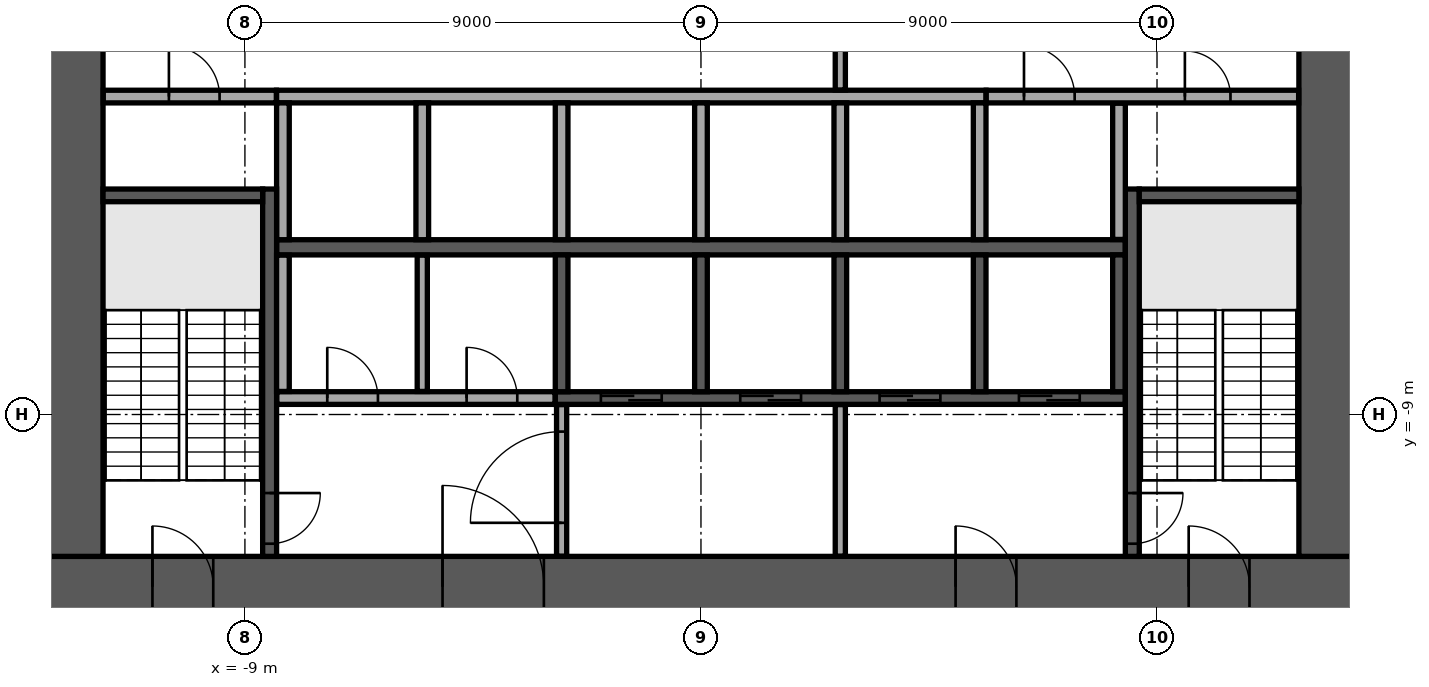
"""IFC4 building model, lengths in metres.
Left out: names, types, materials, properties, quantities, classifications, styles, units other than length and angle.
Written with IfcOpenShell. Run it as: python <this file> out.ifc"""

import sys

from ifc_helpers import new_model, si_unit, direction, frame, frame_2d, origin, place, context, subcontext, project, spatial, rectangle, extrude, element, fill, save


model = new_model("IFC4")
c1 = context("Model", 3, precision=1e-05, world=origin(), true_north=direction((0.0, 1.0)))
c2 = subcontext(c1, "Body", "Model", "MODEL_VIEW")
j1 = project(units=[si_unit("LENGTHUNIT", "METRE"), si_unit("PLANEANGLEUNIT", "RADIAN")], contexts=[c1])
p1 = place(None, origin())
s1 = spatial("IfcSite", under=j1, at=p1, CompositionType="ELEMENT")
p2 = place(p1, origin())
s2 = spatial("IfcBuilding", under=s1, at=p2, CompositionType="ELEMENT")
p3 = place(p2, frame((0.0, 0.0, 22.5)))
s3 = spatial("IfcBuildingStorey", under=s2, at=p3, CompositionType="ELEMENT", Elevation=22.5)
p4 = place(p3, frame((-13.0, -12.4, 0.0), z_axis=(0.0, 0.0, 1.0), x_axis=(1.0, 0.0, 0.0)))
e1 = element("IfcWall", 1, at=p4, inside=s3, PredefinedType="SHEAR", context=c2, shape_type="SweptSolid", body=[
    extrude(rectangle(XDim=26.0, YDim=1.2, at=frame_2d((13.0, 0.0))), origin(), (0.0, 0.0, 1.0), 4.35),
])
p5 = place(p4, frame((7.9, 0.0, 0.0)))
e2 = element("IfcOpeningElement", 2, at=p5, cuts=e1, PredefinedType="OPENING", context=c2, shape_type="SweptSolid", body=[
    extrude(rectangle(XDim=2.0, YDim=2.1, at=frame_2d((1.0, 1.05))), frame((0.0, 0.61, 0.0), z_axis=(0.0, -1.0, 0.0), x_axis=(1.0, 0.0, 0.0)), (0.0, 0.0, 1.0), 1.22),
])
p6 = place(p4, frame((18.025, 0.0, 0.0)))
e3 = element("IfcOpeningElement", 3, at=p6, cuts=e1, PredefinedType="OPENING", context=c2, shape_type="SweptSolid", body=[
    extrude(rectangle(XDim=1.2, YDim=2.1, at=frame_2d((0.6, 1.05))), frame((0.0, 0.61, 0.0), z_axis=(0.0, -1.0, 0.0), x_axis=(1.0, 0.0, 0.0)), (0.0, 0.0, 1.0), 1.22),
])
p7 = place(p4, frame((2.175, 0.0, 0.0)))
e4 = element("IfcOpeningElement", 4, at=p7, cuts=e1, PredefinedType="OPENING", context=c2, shape_type="SweptSolid", body=[
    extrude(rectangle(XDim=1.2, YDim=2.1, at=frame_2d((0.6, 1.05))), frame((0.0, 0.61, 0.0), z_axis=(0.0, -1.0, 0.0), x_axis=(1.0, 0.0, 0.0)), (0.0, 0.0, 1.0), 1.22),
])
p8 = place(p4, frame((22.625, 0.0, 0.0)))
e5 = element("IfcOpeningElement", 5, at=p8, cuts=e1, PredefinedType="OPENING", context=c2, shape_type="SweptSolid", body=[
    extrude(rectangle(XDim=1.2, YDim=2.1, at=frame_2d((0.6, 1.05))), frame((0.0, 0.61, 0.0), z_axis=(0.0, -1.0, 0.0), x_axis=(1.0, 0.0, 0.0)), (0.0, 0.0, 1.0), 1.22),
])
p9 = place(p3, frame((12.4, -11.8, 0.0), z_axis=(0.0, 0.0, 1.0), x_axis=(0.0, 1.0, 0.0)))
e6 = element("IfcWall", 6, at=p9, inside=s3, PredefinedType="SHEAR", context=c2, shape_type="SweptSolid", body=[
    extrude(rectangle(XDim=23.6, YDim=1.2, at=frame_2d((11.8, 0.0))), origin(), (0.0, 0.0, 1.0), 4.35),
])
p10 = place(p9, frame((10.6, 0.0, 0.0)))
e7 = element("IfcOpeningElement", 7, at=p10, cuts=e6, PredefinedType="OPENING", context=c2, shape_type="SweptSolid", body=[
    extrude(rectangle(XDim=2.4, YDim=2.4, at=frame_2d((1.2, 1.2))), frame((0.0, 0.61, 0.0), z_axis=(0.0, -1.0, 0.0), x_axis=(1.0, 0.0, 0.0)), (0.0, 0.0, 1.0), 1.22),
])
p11 = place(p3, frame((-12.4, -11.8, 0.0), z_axis=(0.0, 0.0, 1.0), x_axis=(0.0, 1.0, 0.0)))
e8 = element("IfcWall", 8, at=p11, inside=s3, PredefinedType="SHEAR", context=c2, shape_type="SweptSolid", body=[
    extrude(rectangle(XDim=23.6, YDim=1.2, at=frame_2d((11.8, 0.0))), origin(), (0.0, 0.0, 1.0), 4.35),
])
p12 = place(p11, frame((10.6, 0.0, 0.0)))
e9 = element("IfcOpeningElement", 9, at=p12, cuts=e8, PredefinedType="OPENING", context=c2, shape_type="SweptSolid", body=[
    extrude(rectangle(XDim=2.4, YDim=2.4, at=frame_2d((1.2, 1.2))), frame((0.0, 0.61, 0.0), z_axis=(0.0, -1.0, 0.0), x_axis=(1.0, 0.0, 0.0)), (0.0, 0.0, 1.0), 1.22),
])
p13 = place(p3, frame((-8.375, -5.7, 0.0), z_axis=(0.0, 0.0, 1.0), x_axis=(1.0, 0.0, 0.0)))
e10 = element("IfcWall", 10, at=p13, inside=s3, PredefinedType="SOLIDWALL", context=c2, shape_type="SweptSolid", body=[
    extrude(rectangle(XDim=16.75, YDim=0.3, at=frame_2d((8.375, 0.0))), origin(), (0.0, 0.0, 1.0), 4.35),
])
p14 = place(p3, frame((-8.375, -2.725, 0.0), z_axis=(0.0, 0.0, 1.0), x_axis=(1.0, 0.0, 0.0)))
e11 = element("IfcWall", 11, at=p14, inside=s3, PredefinedType="SOLIDWALL", context=c2, shape_type="SweptSolid", body=[
    extrude(rectangle(XDim=14.0, YDim=0.25, at=frame_2d((7.0, 0.0))), origin(), (0.0, 0.0, 1.0), 4.35),
])
for number, where, z_axis, x_axis in (
    (12, (-8.25, -5.55, 0.0), (0.0, 0.0, 1.0), (0.0, 1.0, 0.0)),
    (13, (-5.5, -5.55, 0.0), (0.0, 0.0, 1.0), (0.0, 1.0, 0.0)),
    (14, (-2.75, -5.55, 0.0), (0.0, 0.0, 1.0), (0.0, 1.0, 0.0)),
    (15, (0.0, -5.55, 0.0), (0.0, 0.0, 1.0), (0.0, 1.0, 0.0)),
    (16, (2.75, -5.55, 0.0), (0.0, 0.0, 1.0), (0.0, 1.0, 0.0)),
    (17, (5.5, -5.55, 0.0), (0.0, 0.0, 1.0), (0.0, 1.0, 0.0)),
):
    element("IfcWall", number, at=place(p3, frame(where, z_axis=z_axis, x_axis=x_axis)), inside=s3, PredefinedType="SOLIDWALL", context=c2, shape_type="SweptSolid", body=[
        extrude(rectangle(XDim=2.7, YDim=0.25, at=frame_2d((1.35, 0.0))), origin(), (0.0, 0.0, 1.0), 4.35),
    ])
p15 = place(p3, frame((-2.875, -8.675, 0.0), z_axis=(0.0, 0.0, 1.0), x_axis=(1.0, 0.0, 0.0)))
e18 = element("IfcWall", 18, at=p15, inside=s3, PredefinedType="SOLIDWALL", context=c2, shape_type="SweptSolid", body=[
    extrude(rectangle(XDim=11.25, YDim=0.25, at=frame_2d((5.625, 0.0))), origin(), (0.0, 0.0, 1.0), 4.35),
])
p16 = place(p15, frame((0.9, 0.0, 0.0)))
e19 = element("IfcOpeningElement", 19, at=p16, cuts=e18, PredefinedType="OPENING", context=c2, shape_type="SweptSolid", body=[
    extrude(rectangle(XDim=1.2, YDim=2.1, at=frame_2d((0.6, 1.05))), frame((0.0, 0.135, 0.0), z_axis=(0.0, -1.0, 0.0), x_axis=(1.0, 0.0, 0.0)), (0.0, 0.0, 1.0), 0.27),
])
p17 = place(p15, frame((3.65, 0.0, 0.0)))
e20 = element("IfcOpeningElement", 20, at=p17, cuts=e18, PredefinedType="OPENING", context=c2, shape_type="SweptSolid", body=[
    extrude(rectangle(XDim=1.2, YDim=2.1, at=frame_2d((0.6, 1.05))), frame((0.0, 0.135, 0.0), z_axis=(0.0, -1.0, 0.0), x_axis=(1.0, 0.0, 0.0)), (0.0, 0.0, 1.0), 0.27),
])
p18 = place(p15, frame((6.4, 0.0, 0.0)))
e21 = element("IfcOpeningElement", 21, at=p18, cuts=e18, PredefinedType="OPENING", context=c2, shape_type="SweptSolid", body=[
    extrude(rectangle(XDim=1.2, YDim=2.1, at=frame_2d((0.6, 1.05))), frame((0.0, 0.135, 0.0), z_axis=(0.0, -1.0, 0.0), x_axis=(1.0, 0.0, 0.0)), (0.0, 0.0, 1.0), 0.27),
])
p19 = place(p15, frame((9.15, 0.0, 0.0)))
e22 = element("IfcOpeningElement", 22, at=p19, cuts=e18, PredefinedType="OPENING", context=c2, shape_type="SweptSolid", body=[
    extrude(rectangle(XDim=1.2, YDim=2.1, at=frame_2d((0.6, 1.05))), frame((0.0, 0.135, 0.0), z_axis=(0.0, -1.0, 0.0), x_axis=(1.0, 0.0, 0.0)), (0.0, 0.0, 1.0), 0.27),
])
for number, where, z_axis, x_axis in (
    (23, (-2.75, -8.55, 0.0), (0.0, 0.0, 1.0), (0.0, 1.0, 0.0)),
    (24, (0.0, -8.55, 0.0), (0.0, 0.0, 1.0), (0.0, 1.0, 0.0)),
    (25, (2.75, -8.55, 0.0), (0.0, 0.0, 1.0), (0.0, 1.0, 0.0)),
    (26, (5.5, -8.55, 0.0), (0.0, 0.0, 1.0), (0.0, 1.0, 0.0)),
    (27, (8.25, -8.55, 0.0), (0.0, 0.0, 1.0), (0.0, 1.0, 0.0)),
):
    element("IfcWall", number, at=place(p3, frame(where, z_axis=z_axis, x_axis=x_axis)), inside=s3, PredefinedType="SOLIDWALL", context=c2, shape_type="SweptSolid", body=[
        extrude(rectangle(XDim=2.7, YDim=0.25, at=frame_2d((1.35, 0.0))), origin(), (0.0, 0.0, 1.0), 4.35),
    ])
p20 = place(p3, frame((-8.512, -4.55, 0.0), z_axis=(0.0, 0.0, 1.0), x_axis=(0.0, -1.0, 0.0)))
e28 = element("IfcWall", 28, at=p20, inside=s3, PredefinedType="SOLIDWALL", context=c2, shape_type="SweptSolid", body=[
    extrude(rectangle(XDim=7.25, YDim=0.275, at=frame_2d((3.625, 0.0))), origin(), (0.0, 0.0, 1.0), 4.35),
])
p21 = place(p20, frame((6.0, 0.0, 0.0)))
e29 = element("IfcOpeningElement", 29, at=p21, cuts=e28, PredefinedType="OPENING", context=c2, shape_type="SweptSolid", body=[
    extrude(rectangle(XDim=1.0, YDim=2.1, at=frame_2d((0.5, 1.05))), frame((0.0, 0.147, 0.0), z_axis=(0.0, -1.0, 0.0), x_axis=(1.0, 0.0, 0.0)), (0.0, 0.0, 1.0), 0.295),
])
p22 = place(p3, frame((-8.65, -4.675, 0.0), z_axis=(0.0, 0.0, 1.0), x_axis=(-1.0, 0.0, 0.0)))
e30 = element("IfcWall", 30, at=p22, inside=s3, PredefinedType="SOLIDWALL", context=c2, shape_type="SweptSolid", body=[
    extrude(rectangle(XDim=3.15, YDim=0.25, at=frame_2d((1.575, 0.0))), origin(), (0.0, 0.0, 1.0), 4.35),
])
p23 = place(p3, frame((8.512, -4.55, 0.0), z_axis=(0.0, 0.0, 1.0), x_axis=(0.0, -1.0, 0.0)))
e31 = element("IfcWall", 31, at=p23, inside=s3, PredefinedType="SOLIDWALL", context=c2, shape_type="SweptSolid", body=[
    extrude(rectangle(XDim=7.25, YDim=0.275, at=frame_2d((3.625, 0.0))), origin(), (0.0, 0.0, 1.0), 4.35),
])
p24 = place(p23, frame((6.0, 0.0, 0.0)))
e32 = element("IfcOpeningElement", 32, at=p24, cuts=e31, PredefinedType="OPENING", context=c2, shape_type="SweptSolid", body=[
    extrude(rectangle(XDim=1.0, YDim=2.1, at=frame_2d((0.5, 1.05))), frame((0.0, 0.147, 0.0), z_axis=(0.0, -1.0, 0.0), x_axis=(1.0, 0.0, 0.0)), (0.0, 0.0, 1.0), 0.295),
])
p25 = place(p3, frame((8.65, -4.675, 0.0), z_axis=(0.0, 0.0, 1.0), x_axis=(1.0, 0.0, 0.0)))
e33 = element("IfcWall", 33, at=p25, inside=s3, PredefinedType="SOLIDWALL", context=c2, shape_type="SweptSolid", body=[
    extrude(rectangle(XDim=3.15, YDim=0.25, at=frame_2d((1.575, 0.0))), origin(), (0.0, 0.0, 1.0), 4.35),
])
p26 = place(p3, frame((-2.75, -11.795, 0.0), z_axis=(0.0, 0.0, 1.0), x_axis=(0.0, 1.0, 0.0)))
e34 = element("IfcWall", 34, at=p26, inside=s3, PredefinedType="PARTITIONING", context=c2, shape_type="SweptSolid", body=[
    extrude(rectangle(XDim=2.99, YDim=0.2, at=frame_2d((1.495, 0.0))), origin(), (0.0, 0.0, 1.0), 4.35),
])
p27 = place(p26, frame((0.657, 0.0, 0.0)))
e35 = element("IfcOpeningElement", 35, at=p27, cuts=e34, PredefinedType="OPENING", context=c2, shape_type="SweptSolid", body=[
    extrude(rectangle(XDim=1.8, YDim=2.1, at=frame_2d((0.9, 1.05))), frame((0.0, 0.11, 0.0), z_axis=(0.0, -1.0, 0.0), x_axis=(1.0, 0.0, 0.0)), (0.0, 0.0, 1.0), 0.22),
])
p28 = place(p3, frame((2.75, -11.795, 0.0), z_axis=(0.0, 0.0, 1.0), x_axis=(0.0, 1.0, 0.0)))
e36 = element("IfcWall", 36, at=p28, inside=s3, PredefinedType="PARTITIONING", context=c2, shape_type="SweptSolid", body=[
    extrude(rectangle(XDim=2.99, YDim=0.2, at=frame_2d((1.495, 0.0))), origin(), (0.0, 0.0, 1.0), 4.35),
])
p29 = place(p3, frame((-8.37, -8.675, 0.0), z_axis=(0.0, 0.0, 1.0), x_axis=(1.0, 0.0, 0.0)))
e37 = element("IfcWall", 37, at=p29, inside=s3, PredefinedType="PARTITIONING", context=c2, shape_type="SweptSolid", body=[
    extrude(rectangle(XDim=5.49, YDim=0.25, at=frame_2d((2.745, 0.0))), origin(), (0.0, 0.0, 1.0), 4.35),
])
p30 = place(p29, frame((0.995, 0.0, 0.0)))
e38 = element("IfcOpeningElement", 38, at=p30, cuts=e37, PredefinedType="OPENING", context=c2, shape_type="SweptSolid", body=[
    extrude(rectangle(XDim=1.0, YDim=2.1, at=frame_2d((0.5, 1.05))), frame((0.0, 0.135, 0.0), z_axis=(0.0, -1.0, 0.0), x_axis=(1.0, 0.0, 0.0)), (0.0, 0.0, 1.0), 0.27),
])
p31 = place(p29, frame((3.745, 0.0, 0.0)))
e39 = element("IfcOpeningElement", 39, at=p31, cuts=e37, PredefinedType="OPENING", context=c2, shape_type="SweptSolid", body=[
    extrude(rectangle(XDim=1.0, YDim=2.1, at=frame_2d((0.5, 1.05))), frame((0.0, 0.135, 0.0), z_axis=(0.0, -1.0, 0.0), x_axis=(1.0, 0.0, 0.0)), (0.0, 0.0, 1.0), 0.27),
])
p32 = place(p3, frame((-8.25, -8.545, 0.0), z_axis=(0.0, 0.0, 1.0), x_axis=(0.0, 1.0, 0.0)))
e40 = element("IfcWall", 40, at=p32, inside=s3, PredefinedType="PARTITIONING", context=c2, shape_type="SweptSolid", body=[
    extrude(rectangle(XDim=2.69, YDim=0.25, at=frame_2d((1.345, 0.0))), origin(), (0.0, 0.0, 1.0), 4.35),
])
p33 = place(p3, frame((-5.5, -8.545, 0.0), z_axis=(0.0, 0.0, 1.0), x_axis=(0.0, 1.0, 0.0)))
e41 = element("IfcWall", 41, at=p33, inside=s3, PredefinedType="PARTITIONING", context=c2, shape_type="SweptSolid", body=[
    extrude(rectangle(XDim=2.69, YDim=0.2, at=frame_2d((1.345, 0.0))), origin(), (0.0, 0.0, 1.0), 4.35),
])
p34 = place(p3, frame((8.25, -5.545, 0.0), z_axis=(0.0, 0.0, 1.0), x_axis=(0.0, 1.0, 0.0)))
e42 = element("IfcWall", 42, at=p34, inside=s3, PredefinedType="PARTITIONING", context=c2, shape_type="SweptSolid", body=[
    extrude(rectangle(XDim=2.69, YDim=0.25, at=frame_2d((1.345, 0.0))), origin(), (0.0, 0.0, 1.0), 4.35),
])
p35 = place(p3, frame((-11.795, -2.725, 0.0), z_axis=(0.0, 0.0, 1.0), x_axis=(1.0, 0.0, 0.0)))
e43 = element("IfcWall", 43, at=p35, inside=s3, PredefinedType="PARTITIONING", context=c2, shape_type="SweptSolid", body=[
    extrude(rectangle(XDim=3.415, YDim=0.25, at=frame_2d((1.708, 0.0))), origin(), (0.0, 0.0, 1.0), 4.35),
])
p36 = place(p35, frame((1.295, 0.0, 0.0)))
e44 = element("IfcOpeningElement", 44, at=p36, cuts=e43, PredefinedType="OPENING", context=c2, shape_type="SweptSolid", body=[
    extrude(rectangle(XDim=1.0, YDim=2.1, at=frame_2d((0.5, 1.05))), frame((0.0, 0.135, 0.0), z_axis=(0.0, -1.0, 0.0), x_axis=(1.0, 0.0, 0.0)), (0.0, 0.0, 1.0), 0.27),
])
p37 = place(p3, frame((5.63, -2.725, 0.0), z_axis=(0.0, 0.0, 1.0), x_axis=(1.0, 0.0, 0.0)))
e45 = element("IfcWall", 45, at=p37, inside=s3, PredefinedType="PARTITIONING", context=c2, shape_type="SweptSolid", body=[
    extrude(rectangle(XDim=6.165, YDim=0.25, at=frame_2d((3.083, 0.0))), origin(), (0.0, 0.0, 1.0), 4.35),
])
p38 = place(p37, frame((0.745, 0.0, 0.0)))
e46 = element("IfcOpeningElement", 46, at=p38, cuts=e45, PredefinedType="OPENING", context=c2, shape_type="SweptSolid", body=[
    extrude(rectangle(XDim=1.0, YDim=2.1, at=frame_2d((0.5, 1.05))), frame((0.0, 0.135, 0.0), z_axis=(0.0, -1.0, 0.0), x_axis=(1.0, 0.0, 0.0)), (0.0, 0.0, 1.0), 0.27),
])
p39 = place(p37, frame((3.92, 0.0, 0.0)))
e47 = element("IfcOpeningElement", 47, at=p39, cuts=e45, PredefinedType="OPENING", context=c2, shape_type="SweptSolid", body=[
    extrude(rectangle(XDim=0.9, YDim=2.1, at=frame_2d((0.45, 1.05))), frame((0.0, 0.135, 0.0), z_axis=(0.0, -1.0, 0.0), x_axis=(1.0, 0.0, 0.0)), (0.0, 0.0, 1.0), 0.27),
])
p40 = place(p3, frame((2.75, -2.595, 0.0), z_axis=(0.0, 0.0, 1.0), x_axis=(0.0, 1.0, 0.0)))
e48 = element("IfcWall", 48, at=p40, inside=s3, PredefinedType="PARTITIONING", context=c2, shape_type="SweptSolid", body=[
    extrude(rectangle(XDim=5.19, YDim=0.2, at=frame_2d((2.595, 0.0))), origin(), (0.0, 0.0, 1.0), 4.35),
])
p41 = place(p40, frame((1.395, 0.0, 0.0)))
e49 = element("IfcOpeningElement", 49, at=p41, cuts=e48, PredefinedType="OPENING", context=c2, shape_type="SweptSolid", body=[
    extrude(rectangle(XDim=2.4, YDim=2.4, at=frame_2d((1.2, 1.2))), frame((0.0, 0.11, 0.0), z_axis=(0.0, -1.0, 0.0), x_axis=(1.0, 0.0, 0.0)), (0.0, 0.0, 1.0), 0.22),
])
p42 = place(p5, origin())
e50 = element("IfcDoor", 50, at=p42, inside=s3, OperationType="SINGLE_SWING_LEFT", PredefinedType="DOOR", context=c2, shape_type="SweptSolid", body=[
    extrude(rectangle(XDim=2.0, YDim=2.1, at=frame_2d((1.0, 1.05))), frame((0.0, 0.025, 0.0), z_axis=(0.0, -1.0, 0.0), x_axis=(1.0, 0.0, 0.0)), (0.0, 0.0, 1.0), 0.05),
])
fill(e2, e50)
p43 = place(p6, origin())
e51 = element("IfcDoor", 51, at=p43, inside=s3, OperationType="SINGLE_SWING_LEFT", PredefinedType="DOOR", context=c2, shape_type="SweptSolid", body=[
    extrude(rectangle(XDim=1.2, YDim=2.1, at=frame_2d((0.6, 1.05))), frame((0.0, 0.025, 0.0), z_axis=(0.0, -1.0, 0.0), x_axis=(1.0, 0.0, 0.0)), (0.0, 0.0, 1.0), 0.05),
])
fill(e3, e51)
p44 = place(p7, origin())
e52 = element("IfcDoor", 52, at=p44, inside=s3, OperationType="SINGLE_SWING_LEFT", PredefinedType="DOOR", context=c2, shape_type="SweptSolid", body=[
    extrude(rectangle(XDim=1.2, YDim=2.1, at=frame_2d((0.6, 1.05))), frame((0.0, 0.025, 0.0), z_axis=(0.0, -1.0, 0.0), x_axis=(1.0, 0.0, 0.0)), (0.0, 0.0, 1.0), 0.05),
])
fill(e4, e52)
p45 = place(p8, origin())
e53 = element("IfcDoor", 53, at=p45, inside=s3, OperationType="SINGLE_SWING_LEFT", PredefinedType="DOOR", context=c2, shape_type="SweptSolid", body=[
    extrude(rectangle(XDim=1.2, YDim=2.1, at=frame_2d((0.6, 1.05))), frame((0.0, 0.025, 0.0), z_axis=(0.0, -1.0, 0.0), x_axis=(1.0, 0.0, 0.0)), (0.0, 0.0, 1.0), 0.05),
])
fill(e5, e53)
p46 = place(p16, origin())
e54 = element("IfcDoor", 54, at=p46, inside=s3, OperationType="DOUBLE_DOOR_SLIDING", PredefinedType="DOOR", context=c2, shape_type="SweptSolid", body=[
    extrude(rectangle(XDim=1.2, YDim=2.1, at=frame_2d((0.6, 1.05))), frame((0.0, 0.025, 0.0), z_axis=(0.0, -1.0, 0.0), x_axis=(1.0, 0.0, 0.0)), (0.0, 0.0, 1.0), 0.05),
])
fill(e19, e54)
p47 = place(p17, origin())
e55 = element("IfcDoor", 55, at=p47, inside=s3, OperationType="DOUBLE_DOOR_SLIDING", PredefinedType="DOOR", context=c2, shape_type="SweptSolid", body=[
    extrude(rectangle(XDim=1.2, YDim=2.1, at=frame_2d((0.6, 1.05))), frame((0.0, 0.025, 0.0), z_axis=(0.0, -1.0, 0.0), x_axis=(1.0, 0.0, 0.0)), (0.0, 0.0, 1.0), 0.05),
])
fill(e20, e55)
p48 = place(p18, origin())
e56 = element("IfcDoor", 56, at=p48, inside=s3, OperationType="DOUBLE_DOOR_SLIDING", PredefinedType="DOOR", context=c2, shape_type="SweptSolid", body=[
    extrude(rectangle(XDim=1.2, YDim=2.1, at=frame_2d((0.6, 1.05))), frame((0.0, 0.025, 0.0), z_axis=(0.0, -1.0, 0.0), x_axis=(1.0, 0.0, 0.0)), (0.0, 0.0, 1.0), 0.05),
])
fill(e21, e56)
p49 = place(p19, origin())
e57 = element("IfcDoor", 57, at=p49, inside=s3, OperationType="DOUBLE_DOOR_SLIDING", PredefinedType="DOOR", context=c2, shape_type="SweptSolid", body=[
    extrude(rectangle(XDim=1.2, YDim=2.1, at=frame_2d((0.6, 1.05))), frame((0.0, 0.025, 0.0), z_axis=(0.0, -1.0, 0.0), x_axis=(1.0, 0.0, 0.0)), (0.0, 0.0, 1.0), 0.05),
])
fill(e22, e57)
p50 = place(p21, origin())
e58 = element("IfcDoor", 58, at=p50, inside=s3, OperationType="SINGLE_SWING_LEFT", PredefinedType="DOOR", context=c2, shape_type="SweptSolid", body=[
    extrude(rectangle(XDim=1.0, YDim=2.1, at=frame_2d((0.5, 1.05))), frame((0.0, 0.025, 0.0), z_axis=(0.0, -1.0, 0.0), x_axis=(1.0, 0.0, 0.0)), (0.0, 0.0, 1.0), 0.05),
])
fill(e29, e58)
p51 = place(p24, origin())
e59 = element("IfcDoor", 59, at=p51, inside=s3, OperationType="SINGLE_SWING_LEFT", PredefinedType="DOOR", context=c2, shape_type="SweptSolid", body=[
    extrude(rectangle(XDim=1.0, YDim=2.1, at=frame_2d((0.5, 1.05))), frame((0.0, 0.025, 0.0), z_axis=(0.0, -1.0, 0.0), x_axis=(1.0, 0.0, 0.0)), (0.0, 0.0, 1.0), 0.05),
])
fill(e32, e59)
p52 = place(p30, origin())
e60 = element("IfcDoor", 60, at=p52, inside=s3, OperationType="SINGLE_SWING_RIGHT", PredefinedType="DOOR", context=c2, shape_type="SweptSolid", body=[
    extrude(rectangle(XDim=1.0, YDim=2.1, at=frame_2d((0.5, 1.05))), frame((0.0, 0.025, 0.0), z_axis=(0.0, -1.0, 0.0), x_axis=(1.0, 0.0, 0.0)), (0.0, 0.0, 1.0), 0.05),
])
fill(e38, e60)
p53 = place(p31, origin())
e61 = element("IfcDoor", 61, at=p53, inside=s3, OperationType="SINGLE_SWING_RIGHT", PredefinedType="DOOR", context=c2, shape_type="SweptSolid", body=[
    extrude(rectangle(XDim=1.0, YDim=2.1, at=frame_2d((0.5, 1.05))), frame((0.0, 0.025, 0.0), z_axis=(0.0, -1.0, 0.0), x_axis=(1.0, 0.0, 0.0)), (0.0, 0.0, 1.0), 0.05),
])
fill(e39, e61)
p54 = place(p36, origin())
e62 = element("IfcDoor", 62, at=p54, inside=s3, OperationType="SINGLE_SWING_RIGHT", PredefinedType="DOOR", context=c2, shape_type="SweptSolid", body=[
    extrude(rectangle(XDim=1.0, YDim=2.1, at=frame_2d((0.5, 1.05))), frame((0.0, 0.025, 0.0), z_axis=(0.0, -1.0, 0.0), x_axis=(1.0, 0.0, 0.0)), (0.0, 0.0, 1.0), 0.05),
])
fill(e44, e62)
p55 = place(p38, origin())
e63 = element("IfcDoor", 63, at=p55, inside=s3, OperationType="SINGLE_SWING_RIGHT", PredefinedType="DOOR", context=c2, shape_type="SweptSolid", body=[
    extrude(rectangle(XDim=1.0, YDim=2.1, at=frame_2d((0.5, 1.05))), frame((0.0, 0.025, 0.0), z_axis=(0.0, -1.0, 0.0), x_axis=(1.0, 0.0, 0.0)), (0.0, 0.0, 1.0), 0.05),
])
fill(e46, e63)
p56 = place(p39, origin())
e64 = element("IfcDoor", 64, at=p56, inside=s3, OperationType="SINGLE_SWING_RIGHT", PredefinedType="DOOR", context=c2, shape_type="SweptSolid", body=[
    extrude(rectangle(XDim=0.9, YDim=2.1, at=frame_2d((0.45, 1.05))), frame((0.0, 0.025, 0.0), z_axis=(0.0, -1.0, 0.0), x_axis=(1.0, 0.0, 0.0)), (0.0, 0.0, 1.0), 0.05),
])
fill(e47, e64)
p57 = place(p27, origin())
e65 = element("IfcDoor", 65, at=p57, inside=s3, OperationType="SINGLE_SWING_LEFT", PredefinedType="DOOR", context=c2, shape_type="SweptSolid", body=[
    extrude(rectangle(XDim=1.8, YDim=2.1, at=frame_2d((0.9, 1.05))), frame((0.0, 0.025, 0.0), z_axis=(0.0, -1.0, 0.0), x_axis=(1.0, 0.0, 0.0)), (0.0, 0.0, 1.0), 0.05),
])
fill(e35, e65)
save(model, sys.argv[1])
